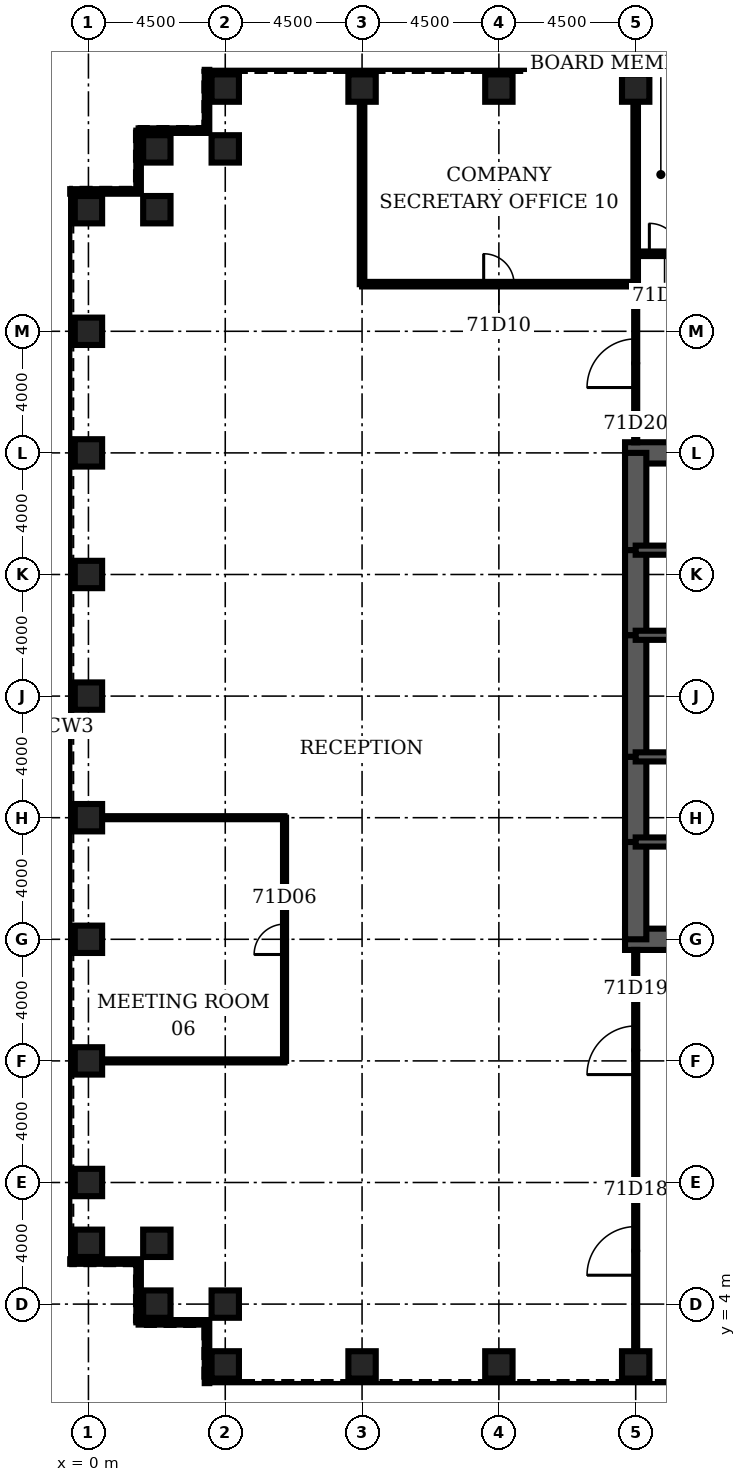
"""IFC4 building model, lengths in metres.
Left out: names, types, materials, properties, quantities, classifications, styles, units other than length and angle.
Written with IfcOpenShell. Run it as: python <this file> out.ifc"""

import sys

from ifc_helpers import new_model, si_unit, direction, frame, frame_2d, origin, origin_2d, place, context, subcontext, project, spatial, rectangle, hollow_rectangle, extrude, element, fill, save


model = new_model("IFC4")
c1 = context("Model", 3, precision=1e-05, world=origin(), true_north=direction((0.0, 1.0)))
c2 = subcontext(c1, "Body", "Model", "MODEL_VIEW")
j1 = project(units=[si_unit("LENGTHUNIT", "METRE"), si_unit("PLANEANGLEUNIT", "RADIAN")], contexts=[c1])
p1 = place(None, origin())
s1 = spatial("IfcSite", under=j1, at=p1, CompositionType="ELEMENT")
p2 = place(p1, origin())
s2 = spatial("IfcBuilding", under=s1, at=p2, CompositionType="ELEMENT")
p3 = place(p2, frame((0.0, 0.0, 313.1)))
s3 = spatial("IfcBuildingStorey", under=s2, at=p3, CompositionType="ELEMENT", Elevation=313.1)
for number, where, z_axis, x_axis in (
    (1, (4.5, 2.0, 0.0), (0.0, 0.0, 1.0), (0.0, 1.0, 0.0)),
    (2, (9.0, 2.0, 0.0), (0.0, 0.0, 1.0), (0.0, 1.0, 0.0)),
    (3, (13.5, 2.0, 0.0), (0.0, 0.0, 1.0), (0.0, 1.0, 0.0)),
    (4, (18.0, 2.0, 0.0), (0.0, 0.0, 1.0), (0.0, 1.0, 0.0)),
    (5, (18.0, 44.0, 0.0), (0.0, 0.0, 1.0), (0.0, 1.0, 0.0)),
    (6, (13.5, 44.0, 0.0), (0.0, 0.0, 1.0), (0.0, 1.0, 0.0)),
    (7, (9.0, 44.0, 0.0), (0.0, 0.0, 1.0), (0.0, 1.0, 0.0)),
    (8, (4.5, 44.0, 0.0), (0.0, 0.0, 1.0), (0.0, 1.0, 0.0)),
    (9, (4.5, 42.0, 0.0), (0.0, 0.0, 1.0), (0.0, 1.0, 0.0)),
    (10, (2.25, 42.0, 0.0), (0.0, 0.0, 1.0), (1.0, 0.0, 0.0)),
    (11, (2.25, 40.0, 0.0), (0.0, 0.0, 1.0), (1.0, 0.0, 0.0)),
    (12, (0.0, 40.0, 0.0), (0.0, 0.0, 1.0), (1.0, 0.0, 0.0)),
    (13, (0.0, 36.0, 0.0), (0.0, 0.0, 1.0), (1.0, 0.0, 0.0)),
    (14, (0.0, 32.0, 0.0), (0.0, 0.0, 1.0), (1.0, 0.0, 0.0)),
    (15, (0.0, 28.0, 0.0), (0.0, 0.0, 1.0), (1.0, 0.0, 0.0)),
    (16, (0.0, 24.0, 0.0), (0.0, 0.0, 1.0), (1.0, 0.0, 0.0)),
    (17, (0.0, 20.0, 0.0), (0.0, 0.0, 1.0), (1.0, 0.0, 0.0)),
    (18, (0.0, 16.0, 0.0), (0.0, 0.0, 1.0), (1.0, 0.0, 0.0)),
    (19, (0.0, 12.0, 0.0), (0.0, 0.0, 1.0), (1.0, 0.0, 0.0)),
    (20, (0.0, 8.0, 0.0), (0.0, 0.0, 1.0), (1.0, 0.0, 0.0)),
    (21, (0.0, 6.0, 0.0), (0.0, 0.0, 1.0), (1.0, 0.0, 0.0)),
    (22, (2.25, 6.0, 0.0), (0.0, 0.0, 1.0), (1.0, 0.0, 0.0)),
    (23, (2.25, 4.0, 0.0), (0.0, 0.0, 1.0), (1.0, 0.0, 0.0)),
    (24, (4.5, 4.0, 0.0), (0.0, 0.0, 1.0), (0.0, 1.0, 0.0)),
):
    element("IfcColumn", number, at=place(p3, frame(where, z_axis=z_axis, x_axis=x_axis)), inside=s3, PredefinedType="COLUMN", context=c2, shape_type="SweptSolid", body=[
        extrude(hollow_rectangle(XDim=0.9, YDim=0.9, WallThickness=0.05, at=origin_2d()), origin(), (0.0, 0.0, 1.0), 4.2),
    ])
for number, where, z_axis, x_axis in (
    (25, (17.65, 16.0, 0.0), (0.0, 0.0, 1.0), (1.0, 0.0, 0.0)),
    (26, (27.0, 32.0, 0.0), (0.0, 0.0, 1.0), (-1.0, 0.0, 0.0)),
):
    element("IfcWall", number, at=place(p3, frame(where, z_axis=z_axis, x_axis=x_axis)), inside=s3, PredefinedType="SHEAR", context=c2, shape_type="SweptSolid", body=[
        extrude(rectangle(XDim=9.35, YDim=0.7, at=frame_2d((4.675, 0.0))), origin(), (0.0, 0.0, 1.0), 4.2),
    ])
p4 = place(p3, frame((18.0, 32.0, 0.0), z_axis=(0.0, 0.0, 1.0), x_axis=(0.0, -1.0, 0.0)))
e27 = element("IfcWall", 27, at=p4, inside=s3, PredefinedType="SHEAR", context=c2, shape_type="SweptSolid", body=[
    extrude(rectangle(XDim=3.2, YDim=0.7, at=frame_2d((1.6, 0.0))), origin(), (0.0, 0.0, 1.0), 4.2),
])
p5 = place(p3, frame((18.0, 28.8, 0.0), z_axis=(0.0, 0.0, 1.0), x_axis=(0.0, -1.0, 0.0)))
e28 = element("IfcWall", 28, at=p5, inside=s3, PredefinedType="SHEAR", context=c2, shape_type="SweptSolid", body=[
    extrude(rectangle(XDim=2.8, YDim=0.7, at=frame_2d((1.4, 0.0))), origin(), (0.0, 0.0, 1.0), 4.2),
])
p6 = place(p5, frame((0.4, 0.0, 0.0)))
e29 = element("IfcOpeningElement", 29, at=p6, cuts=e28, PredefinedType="OPENING", context=c2, shape_type="SweptSolid", body=[
    extrude(rectangle(XDim=1.8, YDim=2.1, at=frame_2d((0.9, 1.05))), frame((0.0, 0.36, 0.0), z_axis=(0.0, -1.0, 0.0), x_axis=(1.0, 0.0, 0.0)), (0.0, 0.0, 1.0), 0.72),
])
p7 = place(p3, frame((18.0, 26.0, 0.0), z_axis=(0.0, 0.0, 1.0), x_axis=(0.0, -1.0, 0.0)))
e30 = element("IfcWall", 30, at=p7, inside=s3, PredefinedType="SHEAR", context=c2, shape_type="SweptSolid", body=[
    extrude(rectangle(XDim=4.0, YDim=0.7, at=frame_2d((2.0, 0.0))), origin(), (0.0, 0.0, 1.0), 4.2),
])
p8 = place(p3, frame((18.0, 22.0, 0.0), z_axis=(0.0, 0.0, 1.0), x_axis=(0.0, -1.0, 0.0)))
e31 = element("IfcWall", 31, at=p8, inside=s3, PredefinedType="SHEAR", context=c2, shape_type="SweptSolid", body=[
    extrude(rectangle(XDim=2.8, YDim=0.7, at=frame_2d((1.4, 0.0))), origin(), (0.0, 0.0, 1.0), 4.2),
])
p9 = place(p8, frame((0.6, 0.0, 0.0)))
e32 = element("IfcOpeningElement", 32, at=p9, cuts=e31, PredefinedType="OPENING", context=c2, shape_type="SweptSolid", body=[
    extrude(rectangle(XDim=1.8, YDim=2.1, at=frame_2d((0.9, 1.05))), frame((0.0, 0.36, 0.0), z_axis=(0.0, -1.0, 0.0), x_axis=(1.0, 0.0, 0.0)), (0.0, 0.0, 1.0), 0.72),
])
p10 = place(p3, frame((18.0, 19.2, 0.0), z_axis=(0.0, 0.0, 1.0), x_axis=(0.0, -1.0, 0.0)))
e33 = element("IfcWall", 33, at=p10, inside=s3, PredefinedType="SHEAR", context=c2, shape_type="SweptSolid", body=[
    extrude(rectangle(XDim=3.2, YDim=0.7, at=frame_2d((1.6, 0.0))), origin(), (0.0, 0.0, 1.0), 4.2),
])
p11 = place(p3, frame((18.0, 19.2, 0.0), z_axis=(0.0, 0.0, 1.0), x_axis=(1.0, 0.0, 0.0)))
e34 = element("IfcWall", 34, at=p11, inside=s3, PredefinedType="SOLIDWALL", context=c2, shape_type="SweptSolid", body=[
    extrude(rectangle(XDim=9.0, YDim=0.3, at=frame_2d((4.5, 0.0))), origin(), (0.0, 0.0, 1.0), 4.2),
])
p12 = place(p11, frame((0.65, 0.0, 0.0)))
e35 = element("IfcOpeningElement", 35, at=p12, cuts=e34, PredefinedType="OPENING", context=c2, shape_type="SweptSolid", body=[
    extrude(rectangle(XDim=1.0, YDim=2.1, at=frame_2d((0.5, 1.05))), frame((0.0, 0.16, 0.0), z_axis=(0.0, -1.0, 0.0), x_axis=(1.0, 0.0, 0.0)), (0.0, 0.0, 1.0), 0.32),
])
p13 = place(p3, frame((18.0, 28.8, 0.0), z_axis=(0.0, 0.0, 1.0), x_axis=(1.0, 0.0, 0.0)))
e36 = element("IfcWall", 36, at=p13, inside=s3, PredefinedType="SOLIDWALL", context=c2, shape_type="SweptSolid", body=[
    extrude(rectangle(XDim=9.0, YDim=0.3, at=frame_2d((4.5, 0.0))), origin(), (0.0, 0.0, 1.0), 4.2),
])
p14 = place(p13, frame((0.65, 0.0, 0.0)))
e37 = element("IfcOpeningElement", 37, at=p14, cuts=e36, PredefinedType="OPENING", context=c2, shape_type="SweptSolid", body=[
    extrude(rectangle(XDim=1.0, YDim=2.1, at=frame_2d((0.5, 1.05))), frame((0.0, 0.16, 0.0), z_axis=(0.0, -1.0, 0.0), x_axis=(1.0, 0.0, 0.0)), (0.0, 0.0, 1.0), 0.32),
])
p15 = place(p3, frame((18.0, 22.0, 0.0), z_axis=(0.0, 0.0, 1.0), x_axis=(1.0, 0.0, 0.0)))
e38 = element("IfcWall", 38, at=p15, inside=s3, PredefinedType="SOLIDWALL", context=c2, shape_type="SweptSolid", body=[
    extrude(rectangle(XDim=6.0, YDim=0.3, at=frame_2d((3.0, 0.0))), origin(), (0.0, 0.0, 1.0), 4.2),
])
p16 = place(p15, frame((4.4, 0.0, 0.0)))
e39 = element("IfcOpeningElement", 39, at=p16, cuts=e38, PredefinedType="OPENING", context=c2, shape_type="SweptSolid", body=[
    extrude(rectangle(XDim=1.0, YDim=2.1, at=frame_2d((0.5, 1.05))), frame((0.0, 0.16, 0.0), z_axis=(0.0, -1.0, 0.0), x_axis=(1.0, 0.0, 0.0)), (0.0, 0.0, 1.0), 0.32),
])
p17 = place(p15, frame((0.75, 0.0, 0.0)))
e40 = element("IfcOpeningElement", 40, at=p17, cuts=e38, PredefinedType="OPENING", context=c2, shape_type="SweptSolid", body=[
    extrude(rectangle(XDim=1.0, YDim=2.1, at=frame_2d((0.5, 1.05))), frame((0.0, 0.16, 0.0), z_axis=(0.0, -1.0, 0.0), x_axis=(1.0, 0.0, 0.0)), (0.0, 0.0, 1.0), 0.32),
])
p18 = place(p3, frame((18.0, 26.0, 0.0), z_axis=(0.0, 0.0, 1.0), x_axis=(1.0, 0.0, 0.0)))
e41 = element("IfcWall", 41, at=p18, inside=s3, PredefinedType="SOLIDWALL", context=c2, shape_type="SweptSolid", body=[
    extrude(rectangle(XDim=6.0, YDim=0.3, at=frame_2d((3.0, 0.0))), origin(), (0.0, 0.0, 1.0), 4.2),
])
for number, where, z_axis, x_axis in (
    (42, (0.45, 12.0, 0.0), (0.0, 0.0, 1.0), (1.0, 0.0, 0.0)),
    (43, (0.45, 20.0, 0.0), (0.0, 0.0, 1.0), (1.0, 0.0, 0.0)),
):
    element("IfcWall", number, at=place(p3, frame(where, z_axis=z_axis, x_axis=x_axis)), inside=s3, PredefinedType="PARTITIONING", context=c2, shape_type="SweptSolid", body=[
        extrude(rectangle(XDim=6.0, YDim=0.1, at=frame_2d((3.0, 0.0))), origin(), (0.0, 0.0, 1.0), 3.0),
    ])
p19 = place(p3, frame((9.0, 37.55, 0.0), z_axis=(0.0, 0.0, 1.0), x_axis=(1.0, 0.0, 0.0)))
e44 = element("IfcWall", 44, at=p19, inside=s3, PredefinedType="PARTITIONING", context=c2, shape_type="SweptSolid", body=[
    extrude(rectangle(XDim=9.0, YDim=0.15, at=frame_2d((4.5, 0.0))), origin(), (0.0, 0.0, 1.0), 3.0),
])
p20 = place(p19, frame((4.0, 0.0, 0.0)))
e45 = element("IfcOpeningElement", 45, at=p20, cuts=e44, PredefinedType="OPENING", context=c2, shape_type="SweptSolid", body=[
    extrude(rectangle(XDim=1.0, YDim=2.1, at=frame_2d((0.5, 1.05))), frame((0.0, 0.085, 0.0), z_axis=(0.0, -1.0, 0.0), x_axis=(1.0, 0.0, 0.0)), (0.0, 0.0, 1.0), 0.17),
])
p21 = place(p3, frame((18.0, 38.55, 0.0), z_axis=(0.0, 0.0, 1.0), x_axis=(1.0, 0.0, 0.0)))
e46 = element("IfcWall", 46, at=p21, inside=s3, PredefinedType="PARTITIONING", context=c2, shape_type="SweptSolid", body=[
    extrude(rectangle(XDim=27.0, YDim=0.15, at=frame_2d((13.5, 0.0))), origin(), (0.0, 0.0, 1.0), 3.0),
])
p22 = place(p21, frame((0.45, 0.0, 0.0)))
e47 = element("IfcOpeningElement", 47, at=p22, cuts=e46, PredefinedType="OPENING", context=c2, shape_type="SweptSolid", body=[
    extrude(rectangle(XDim=1.0, YDim=2.1, at=frame_2d((0.5, 1.05))), frame((0.0, 0.085, 0.0), z_axis=(0.0, -1.0, 0.0), x_axis=(1.0, 0.0, 0.0)), (0.0, 0.0, 1.0), 0.17),
])
p23 = place(p21, frame((4.95, 0.0, 0.0)))
e48 = element("IfcOpeningElement", 48, at=p23, cuts=e46, PredefinedType="OPENING", context=c2, shape_type="SweptSolid", body=[
    extrude(rectangle(XDim=1.0, YDim=2.1, at=frame_2d((0.5, 1.05))), frame((0.0, 0.085, 0.0), z_axis=(0.0, -1.0, 0.0), x_axis=(1.0, 0.0, 0.0)), (0.0, 0.0, 1.0), 0.17),
])
p24 = place(p21, frame((9.45, 0.0, 0.0)))
e49 = element("IfcOpeningElement", 49, at=p24, cuts=e46, PredefinedType="OPENING", context=c2, shape_type="SweptSolid", body=[
    extrude(rectangle(XDim=1.0, YDim=2.1, at=frame_2d((0.5, 1.05))), frame((0.0, 0.085, 0.0), z_axis=(0.0, -1.0, 0.0), x_axis=(1.0, 0.0, 0.0)), (0.0, 0.0, 1.0), 0.17),
])
p25 = place(p21, frame((13.95, 0.0, 0.0)))
e50 = element("IfcOpeningElement", 50, at=p25, cuts=e46, PredefinedType="OPENING", context=c2, shape_type="SweptSolid", body=[
    extrude(rectangle(XDim=1.0, YDim=2.1, at=frame_2d((0.5, 1.05))), frame((0.0, 0.085, 0.0), z_axis=(0.0, -1.0, 0.0), x_axis=(1.0, 0.0, 0.0)), (0.0, 0.0, 1.0), 0.17),
])
p26 = place(p21, frame((18.45, 0.0, 0.0)))
e51 = element("IfcOpeningElement", 51, at=p26, cuts=e46, PredefinedType="OPENING", context=c2, shape_type="SweptSolid", body=[
    extrude(rectangle(XDim=1.0, YDim=2.1, at=frame_2d((0.5, 1.05))), frame((0.0, 0.085, 0.0), z_axis=(0.0, -1.0, 0.0), x_axis=(1.0, 0.0, 0.0)), (0.0, 0.0, 1.0), 0.17),
])
p27 = place(p21, frame((22.95, 0.0, 0.0)))
e52 = element("IfcOpeningElement", 52, at=p27, cuts=e46, PredefinedType="OPENING", context=c2, shape_type="SweptSolid", body=[
    extrude(rectangle(XDim=1.0, YDim=2.1, at=frame_2d((0.5, 1.05))), frame((0.0, 0.085, 0.0), z_axis=(0.0, -1.0, 0.0), x_axis=(1.0, 0.0, 0.0)), (0.0, 0.0, 1.0), 0.17),
])
p28 = place(p3, frame((6.45, 12.0, 0.0), z_axis=(0.0, 0.0, 1.0), x_axis=(0.0, 1.0, 0.0)))
e53 = element("IfcWall", 53, at=p28, inside=s3, PredefinedType="PARTITIONING", context=c2, shape_type="SweptSolid", body=[
    extrude(rectangle(XDim=8.0, YDim=0.1, at=frame_2d((4.0, 0.0))), origin(), (0.0, 0.0, 1.0), 3.0),
])
p29 = place(p28, frame((3.5, 0.0, 0.0)))
e54 = element("IfcOpeningElement", 54, at=p29, cuts=e53, PredefinedType="OPENING", context=c2, shape_type="SweptSolid", body=[
    extrude(rectangle(XDim=1.0, YDim=2.1, at=frame_2d((0.5, 1.05))), frame((0.0, 0.06, 0.0), z_axis=(0.0, -1.0, 0.0), x_axis=(1.0, 0.0, 0.0)), (0.0, 0.0, 1.0), 0.12),
])
p30 = place(p3, frame((9.0, 37.55, 0.0), z_axis=(0.0, 0.0, 1.0), x_axis=(0.0, 1.0, 0.0)))
e55 = element("IfcWall", 55, at=p30, inside=s3, PredefinedType="PARTITIONING", context=c2, shape_type="SweptSolid", body=[
    extrude(rectangle(XDim=6.0, YDim=0.15, at=frame_2d((3.0, 0.0))), origin(), (0.0, 0.0, 1.0), 3.0),
])
p31 = place(p3, frame((18.0, 2.45, 0.0), z_axis=(0.0, 0.0, 1.0), x_axis=(0.0, 1.0, 0.0)))
e56 = element("IfcWall", 56, at=p31, inside=s3, PredefinedType="PARTITIONING", context=c2, shape_type="SweptSolid", body=[
    extrude(rectangle(XDim=13.2, YDim=0.1, at=frame_2d((6.6, 0.0))), origin(), (0.0, 0.0, 1.0), 3.0),
])
p32 = place(p31, frame((2.5, 0.0, 0.0)))
e57 = element("IfcOpeningElement", 57, at=p32, cuts=e56, PredefinedType="OPENING", context=c2, shape_type="SweptSolid", body=[
    extrude(rectangle(XDim=1.6, YDim=2.1, at=frame_2d((0.8, 1.05))), frame((0.0, 0.06, 0.0), z_axis=(0.0, -1.0, 0.0), x_axis=(1.0, 0.0, 0.0)), (0.0, 0.0, 1.0), 0.12),
])
p33 = place(p31, frame((9.1, 0.0, 0.0)))
e58 = element("IfcOpeningElement", 58, at=p33, cuts=e56, PredefinedType="OPENING", context=c2, shape_type="SweptSolid", body=[
    extrude(rectangle(XDim=1.6, YDim=2.1, at=frame_2d((0.8, 1.05))), frame((0.0, 0.06, 0.0), z_axis=(0.0, -1.0, 0.0), x_axis=(1.0, 0.0, 0.0)), (0.0, 0.0, 1.0), 0.12),
])
p34 = place(p3, frame((18.0, 32.35, 0.0), z_axis=(0.0, 0.0, 1.0), x_axis=(0.0, 1.0, 0.0)))
e59 = element("IfcWall", 59, at=p34, inside=s3, PredefinedType="PARTITIONING", context=c2, shape_type="SweptSolid", body=[
    extrude(rectangle(XDim=5.2, YDim=0.1, at=frame_2d((2.6, 0.0))), origin(), (0.0, 0.0, 1.0), 3.0),
])
p35 = place(p34, frame((1.8, 0.0, 0.0)))
e60 = element("IfcOpeningElement", 60, at=p35, cuts=e59, PredefinedType="OPENING", context=c2, shape_type="SweptSolid", body=[
    extrude(rectangle(XDim=1.6, YDim=2.1, at=frame_2d((0.8, 1.05))), frame((0.0, 0.06, 0.0), z_axis=(0.0, -1.0, 0.0), x_axis=(1.0, 0.0, 0.0)), (0.0, 0.0, 1.0), 0.12),
])
p36 = place(p3, frame((18.0, 37.55, 0.0), z_axis=(0.0, 0.0, 1.0), x_axis=(0.0, 1.0, 0.0)))
e61 = element("IfcWall", 61, at=p36, inside=s3, PredefinedType="PARTITIONING", context=c2, shape_type="SweptSolid", body=[
    extrude(rectangle(XDim=6.0, YDim=0.15, at=frame_2d((3.0, 0.0))), origin(), (0.0, 0.0, 1.0), 3.0),
])
p37 = place(p3, frame((3.9, 44.6, 0.0), z_axis=(0.0, 0.0, 1.0), x_axis=(0.0, -1.0, 0.0)))
e62 = element("IfcWall", 62, at=p37, inside=s3, PredefinedType="ELEMENTEDWALL", context=c2, shape_type="SweptSolid", body=[
    extrude(rectangle(XDim=2.0, YDim=0.15, at=frame_2d((1.0, 0.0))), origin(), (0.0, 0.0, 1.0), 4.04),
])
p38 = place(p3, frame((3.9, 42.6, 0.0), z_axis=(0.0, 0.0, 1.0), x_axis=(-1.0, 0.0, 0.0)))
e63 = element("IfcWall", 63, at=p38, inside=s3, PredefinedType="ELEMENTEDWALL", context=c2, shape_type="SweptSolid", body=[
    extrude(rectangle(XDim=2.25, YDim=0.15, at=frame_2d((1.125, 0.0))), origin(), (0.0, 0.0, 1.0), 4.04),
])
p39 = place(p3, frame((1.65, 42.6, 0.0), z_axis=(0.0, 0.0, 1.0), x_axis=(0.0, -1.0, 0.0)))
e64 = element("IfcWall", 64, at=p39, inside=s3, PredefinedType="ELEMENTEDWALL", context=c2, shape_type="SweptSolid", body=[
    extrude(rectangle(XDim=2.0, YDim=0.15, at=frame_2d((1.0, 0.0))), origin(), (0.0, 0.0, 1.0), 4.04),
])
for number, where, z_axis, x_axis in (
    (65, (1.65, 40.6, 0.0), (0.0, 0.0, 1.0), (-1.0, 0.0, 0.0)),
    (66, (-0.6, 5.4, 0.0), (0.0, 0.0, 1.0), (1.0, 0.0, 0.0)),
):
    element("IfcWall", number, at=place(p3, frame(where, z_axis=z_axis, x_axis=x_axis)), inside=s3, PredefinedType="ELEMENTEDWALL", context=c2, shape_type="SweptSolid", body=[
        extrude(rectangle(XDim=2.25, YDim=0.15, at=frame_2d((1.125, 0.0))), origin(), (0.0, 0.0, 1.0), 4.04),
    ])
p40 = place(p3, frame((1.65, 5.4, 0.0), z_axis=(0.0, 0.0, 1.0), x_axis=(0.0, -1.0, 0.0)))
e67 = element("IfcWall", 67, at=p40, inside=s3, PredefinedType="ELEMENTEDWALL", context=c2, shape_type="SweptSolid", body=[
    extrude(rectangle(XDim=2.0, YDim=0.15, at=frame_2d((1.0, 0.0))), origin(), (0.0, 0.0, 1.0), 4.04),
])
p41 = place(p3, frame((1.65, 3.4, 0.0), z_axis=(0.0, 0.0, 1.0), x_axis=(1.0, 0.0, 0.0)))
e68 = element("IfcWall", 68, at=p41, inside=s3, PredefinedType="ELEMENTEDWALL", context=c2, shape_type="SweptSolid", body=[
    extrude(rectangle(XDim=2.25, YDim=0.15, at=frame_2d((1.125, 0.0))), origin(), (0.0, 0.0, 1.0), 4.04),
])
p42 = place(p3, frame((3.9, 3.4, 0.0), z_axis=(0.0, 0.0, 1.0), x_axis=(0.0, -1.0, 0.0)))
e69 = element("IfcWall", 69, at=p42, inside=s3, PredefinedType="ELEMENTEDWALL", context=c2, shape_type="SweptSolid", body=[
    extrude(rectangle(XDim=2.0, YDim=0.15, at=frame_2d((1.0, 0.0))), origin(), (0.0, 0.0, 1.0), 4.04),
])
p43 = place(p29, origin())
e70 = element("IfcDoor", 70, at=p43, inside=s3, OperationType="SINGLE_SWING_LEFT", PredefinedType="DOOR", context=c2, shape_type="SweptSolid", body=[
    extrude(rectangle(XDim=1.0, YDim=2.1, at=frame_2d((0.5, 1.05))), frame((0.0, 0.025, 0.0), z_axis=(0.0, -1.0, 0.0), x_axis=(1.0, 0.0, 0.0)), (0.0, 0.0, 1.0), 0.05),
])
fill(e54, e70)
p44 = place(p20, origin())
e71 = element("IfcDoor", 71, at=p44, inside=s3, OperationType="SINGLE_SWING_LEFT", PredefinedType="DOOR", context=c2, shape_type="SweptSolid", body=[
    extrude(rectangle(XDim=1.0, YDim=2.1, at=frame_2d((0.5, 1.05))), frame((0.0, 0.025, 0.0), z_axis=(0.0, -1.0, 0.0), x_axis=(1.0, 0.0, 0.0)), (0.0, 0.0, 1.0), 0.05),
])
fill(e45, e71)
p45 = place(p22, origin())
e72 = element("IfcDoor", 72, at=p45, inside=s3, OperationType="SINGLE_SWING_LEFT", PredefinedType="DOOR", context=c2, shape_type="SweptSolid", body=[
    extrude(rectangle(XDim=1.0, YDim=2.1, at=frame_2d((0.5, 1.05))), frame((0.0, 0.025, 0.0), z_axis=(0.0, -1.0, 0.0), x_axis=(1.0, 0.0, 0.0)), (0.0, 0.0, 1.0), 0.05),
])
fill(e47, e72)
p46 = place(p32, origin())
e73 = element("IfcDoor", 73, at=p46, inside=s3, OperationType="SINGLE_SWING_LEFT", PredefinedType="DOOR", context=c2, shape_type="SweptSolid", body=[
    extrude(rectangle(XDim=1.6, YDim=2.1, at=frame_2d((0.8, 1.05))), frame((0.0, 0.025, 0.0), z_axis=(0.0, -1.0, 0.0), x_axis=(1.0, 0.0, 0.0)), (0.0, 0.0, 1.0), 0.05),
])
fill(e57, e73)
p47 = place(p33, origin())
e74 = element("IfcDoor", 74, at=p47, inside=s3, OperationType="SINGLE_SWING_LEFT", PredefinedType="DOOR", context=c2, shape_type="SweptSolid", body=[
    extrude(rectangle(XDim=1.6, YDim=2.1, at=frame_2d((0.8, 1.05))), frame((0.0, 0.025, 0.0), z_axis=(0.0, -1.0, 0.0), x_axis=(1.0, 0.0, 0.0)), (0.0, 0.0, 1.0), 0.05),
])
fill(e58, e74)
p48 = place(p35, origin())
e75 = element("IfcDoor", 75, at=p48, inside=s3, OperationType="SINGLE_SWING_LEFT", PredefinedType="DOOR", context=c2, shape_type="SweptSolid", body=[
    extrude(rectangle(XDim=1.6, YDim=2.1, at=frame_2d((0.8, 1.05))), frame((0.0, 0.025, 0.0), z_axis=(0.0, -1.0, 0.0), x_axis=(1.0, 0.0, 0.0)), (0.0, 0.0, 1.0), 0.05),
])
fill(e60, e75)
p49 = place(p12, origin())
e76 = element("IfcDoor", 76, at=p49, inside=s3, OperationType="SINGLE_SWING_LEFT", PredefinedType="DOOR", context=c2, shape_type="SweptSolid", body=[
    extrude(rectangle(XDim=1.0, YDim=2.1, at=frame_2d((0.5, 1.05))), frame((0.0, 0.025, 0.0), z_axis=(0.0, -1.0, 0.0), x_axis=(1.0, 0.0, 0.0)), (0.0, 0.0, 1.0), 0.05),
])
fill(e35, e76)
p50 = place(p14, origin())
e77 = element("IfcDoor", 77, at=p50, inside=s3, OperationType="SINGLE_SWING_LEFT", PredefinedType="DOOR", context=c2, shape_type="SweptSolid", body=[
    extrude(rectangle(XDim=1.0, YDim=2.1, at=frame_2d((0.5, 1.05))), frame((0.0, 0.025, 0.0), z_axis=(0.0, -1.0, 0.0), x_axis=(1.0, 0.0, 0.0)), (0.0, 0.0, 1.0), 0.05),
])
fill(e37, e77)
p51 = place(p9, origin())
e78 = element("IfcDoor", 78, at=p51, inside=s3, OperationType="SINGLE_SWING_LEFT", PredefinedType="DOOR", context=c2, shape_type="SweptSolid", body=[
    extrude(rectangle(XDim=1.8, YDim=2.1, at=frame_2d((0.9, 1.05))), frame((0.0, 0.35, 0.0), z_axis=(0.0, -1.0, 0.0), x_axis=(1.0, 0.0, 0.0)), (0.0, 0.0, 1.0), 0.699),
])
fill(e32, e78)
p52 = place(p6, origin())
e79 = element("IfcDoor", 79, at=p52, inside=s3, OperationType="SINGLE_SWING_LEFT", PredefinedType="DOOR", context=c2, shape_type="SweptSolid", body=[
    extrude(rectangle(XDim=1.8, YDim=2.1, at=frame_2d((0.9, 1.05))), frame((0.0, 0.35, 0.0), z_axis=(0.0, -1.0, 0.0), x_axis=(1.0, 0.0, 0.0)), (0.0, 0.0, 1.0), 0.699),
])
fill(e29, e79)
p53 = place(p17, origin())
e80 = element("IfcDoor", 80, at=p53, inside=s3, OperationType="SINGLE_SWING_LEFT", PredefinedType="DOOR", context=c2, shape_type="SweptSolid", body=[
    extrude(rectangle(XDim=1.0, YDim=2.1, at=frame_2d((0.5, 1.05))), frame((0.0, 0.025, 0.0), z_axis=(0.0, -1.0, 0.0), x_axis=(1.0, 0.0, 0.0)), (0.0, 0.0, 1.0), 0.05),
])
fill(e40, e80)
save(model, sys.argv[1])
